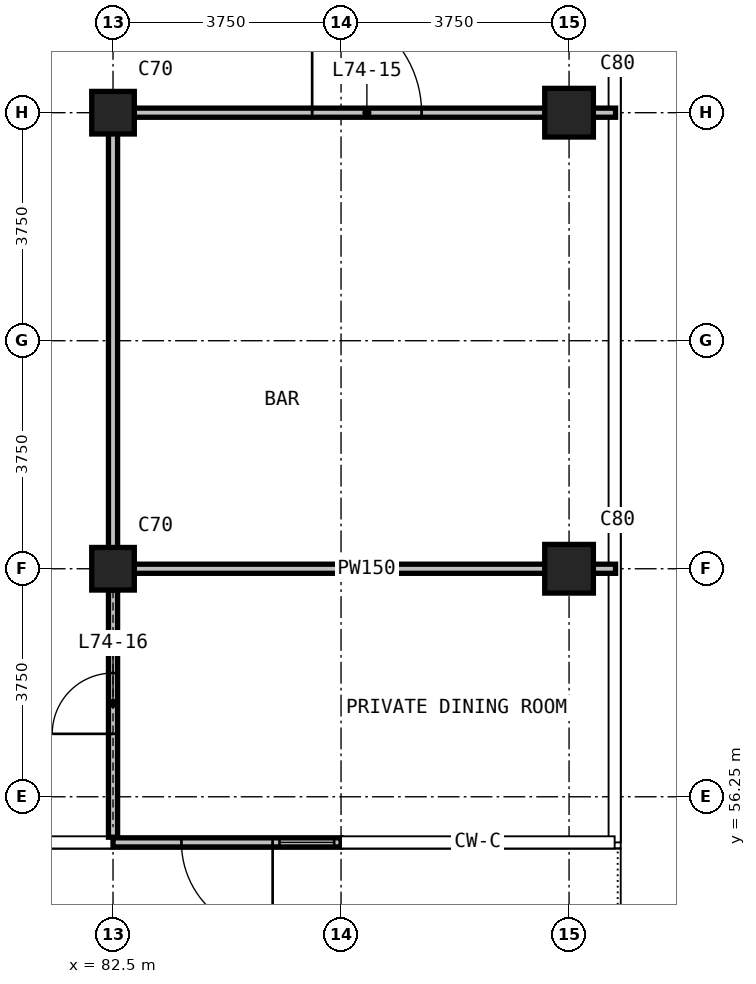
"""IFC4 building model, lengths in metres.
Left out: names, types, materials, properties, quantities, classifications, styles, units other than length and angle.
Written with IfcOpenShell. Run it as: python <this file> out.ifc"""

import sys

from ifc_helpers import new_model, si_unit, direction, frame, frame_2d, origin, origin_2d, place, context, subcontext, project, spatial, rectangle, extrude, element, fill, save


model = new_model("IFC4")
c1 = context("Model", 3, precision=1e-05, world=origin(), true_north=direction((0.0, 1.0)))
c2 = subcontext(c1, "Body", "Model", "MODEL_VIEW")
j1 = project(units=[si_unit("LENGTHUNIT", "METRE"), si_unit("PLANEANGLEUNIT", "RADIAN")], contexts=[c1])
p1 = place(None, origin())
s1 = spatial("IfcSite", under=j1, at=p1, CompositionType="ELEMENT")
p2 = place(p1, origin())
s2 = spatial("IfcBuilding", under=s1, at=p2, CompositionType="ELEMENT")
p3 = place(p2, frame((0.0, 0.0, 283.7)))
s3 = spatial("IfcBuildingStorey", under=s2, at=p3, CompositionType="ELEMENT", Elevation=283.7)
for number, where, z_axis, x_axis in (
    (1, (82.5, 60.0, 0.0), (0.0, 0.0, 1.0), (1.0, 0.0, 0.0)),
    (2, (82.5, 67.5, 0.0), (0.0, 0.0, 1.0), (1.0, 0.0, 0.0)),
):
    element("IfcColumn", number, at=place(p3, frame(where, z_axis=z_axis, x_axis=x_axis)), inside=s3, PredefinedType="COLUMN", context=c2, shape_type="SweptSolid", body=[
        extrude(rectangle(XDim=0.7, YDim=0.7, at=origin_2d()), origin(), (0.0, 0.0, 1.0), 4.0),
    ])
for number, where, z_axis, x_axis in (
    (3, (90.0, 60.0, 0.0), (0.0, 0.0, 1.0), (1.0, 0.0, 0.0)),
    (4, (90.0, 67.5, 0.0), (0.0, 0.0, 1.0), (1.0, 0.0, 0.0)),
):
    element("IfcColumn", number, at=place(p3, frame(where, z_axis=z_axis, x_axis=x_axis)), inside=s3, PredefinedType="COLUMN", context=c2, shape_type="SweptSolid", body=[
        extrude(rectangle(XDim=0.8, YDim=0.8, at=origin_2d()), origin(), (0.0, 0.0, 1.0), 4.0),
    ])
p4 = place(p3, frame((86.25, 55.5, 0.0), z_axis=(0.0, 0.0, 1.0), x_axis=(-1.0, 0.0, 0.0)))
e5 = element("IfcWall", 5, at=p4, inside=s3, PredefinedType="SOLIDWALL", context=c2, shape_type="SweptSolid", body=[
    extrude(rectangle(XDim=3.75, YDim=0.15, at=frame_2d((1.875, 0.0))), origin(), (0.0, 0.0, 1.0), 3.65),
])
p5 = place(p4, frame((0.113, 0.0, 0.1)))
e6 = element("IfcOpeningElement", 6, at=p5, cuts=e5, PredefinedType="OPENING", context=c2, shape_type="SweptSolid", body=[
    extrude(rectangle(XDim=0.9, YDim=2.4, at=frame_2d((0.45, 1.2))), frame((0.0, 0.085, 0.0), z_axis=(0.0, -1.0, 0.0), x_axis=(1.0, 0.0, 0.0)), (0.0, 0.0, 1.0), 0.17),
])
p6 = place(p4, frame((1.125, 0.0, 0.0)))
e7 = element("IfcOpeningElement", 7, at=p6, cuts=e5, PredefinedType="OPENING", context=c2, shape_type="SweptSolid", body=[
    extrude(rectangle(XDim=1.5, YDim=2.4, at=frame_2d((0.75, 1.2))), frame((0.0, 0.085, 0.0), z_axis=(0.0, -1.0, 0.0), x_axis=(1.0, 0.0, 0.0)), (0.0, 0.0, 1.0), 0.17),
])
p7 = place(p3, frame((82.575, 60.0, 0.0), z_axis=(0.0, 0.0, 1.0), x_axis=(1.0, 0.0, 0.0)))
e8 = element("IfcWall", 8, at=p7, inside=s3, PredefinedType="PARTITIONING", context=c2, shape_type="SweptSolid", body=[
    extrude(rectangle(XDim=8.19, YDim=0.15, at=frame_2d((4.095, 0.0))), origin(), (0.0, 0.0, 1.0), 3.65),
])
p8 = place(p3, frame((82.575, 67.5, 0.0), z_axis=(0.0, 0.0, 1.0), x_axis=(1.0, 0.0, 0.0)))
e9 = element("IfcWall", 9, at=p8, inside=s3, PredefinedType="PARTITIONING", context=c2, shape_type="SweptSolid", body=[
    extrude(rectangle(XDim=8.19, YDim=0.15, at=frame_2d((4.095, 0.0))), origin(), (0.0, 0.0, 1.0), 3.65),
])
p9 = place(p8, frame((3.2, 0.0, 0.0)))
e10 = element("IfcOpeningElement", 10, at=p9, cuts=e9, PredefinedType="OPENING", context=c2, shape_type="SweptSolid", body=[
    extrude(rectangle(XDim=1.8, YDim=2.2, at=frame_2d((0.9, 1.1))), frame((0.0, 0.085, 0.0), z_axis=(0.0, -1.0, 0.0), x_axis=(1.0, 0.0, 0.0)), (0.0, 0.0, 1.0), 0.17),
])
p10 = place(p3, frame((82.5, 55.585, 0.0), z_axis=(0.0, 0.0, 1.0), x_axis=(0.0, 1.0, 0.0)))
e11 = element("IfcWall", 11, at=p10, inside=s3, PredefinedType="PARTITIONING", context=c2, shape_type="SweptSolid", body=[
    extrude(rectangle(XDim=4.065, YDim=0.15, at=frame_2d((2.032, 0.0))), origin(), (0.0, 0.0, 1.0), 2.85),
])
p11 = place(p10, frame((1.7, 0.0, 0.0)))
e12 = element("IfcOpeningElement", 12, at=p11, cuts=e11, PredefinedType="OPENING", context=c2, shape_type="SweptSolid", body=[
    extrude(rectangle(XDim=1.0, YDim=2.2, at=frame_2d((0.5, 1.1))), frame((0.0, 0.085, 0.0), z_axis=(0.0, -1.0, 0.0), x_axis=(1.0, 0.0, 0.0)), (0.0, 0.0, 1.0), 0.17),
])
p12 = place(p3, frame((82.5, 59.65, 0.0), z_axis=(0.0, 0.0, 1.0), x_axis=(0.0, 1.0, 0.0)))
e13 = element("IfcWall", 13, at=p12, inside=s3, PredefinedType="PARTITIONING", context=c2, shape_type="SweptSolid", body=[
    extrude(rectangle(XDim=7.925, YDim=0.15, at=frame_2d((3.962, 0.0))), origin(), (0.0, 0.0, 1.0), 3.65),
])
p13 = place(p5, origin())
e14 = element("IfcWindow", 14, at=p13, inside=s3, PartitioningType="SINGLE_PANEL", PredefinedType="WINDOW", context=c2, shape_type="SweptSolid", body=[
    extrude(rectangle(XDim=0.9, YDim=2.4, at=frame_2d((0.45, 1.2))), frame((0.0, 0.03, 0.0), z_axis=(0.0, -1.0, 0.0), x_axis=(1.0, 0.0, 0.0)), (0.0, 0.0, 1.0), 0.06),
])
fill(e6, e14)
p14 = place(p6, origin())
e15 = element("IfcDoor", 15, at=p14, inside=s3, OperationType="DOUBLE_DOOR_SINGLE_SWING", PredefinedType="DOOR", context=c2, shape_type="SweptSolid", body=[
    extrude(rectangle(XDim=1.5, YDim=2.4, at=frame_2d((0.75, 1.2))), frame((0.0, 0.025, 0.0), z_axis=(0.0, -1.0, 0.0), x_axis=(1.0, 0.0, 0.0)), (0.0, 0.0, 1.0), 0.05),
])
fill(e7, e15)
p15 = place(p9, origin())
e16 = element("IfcDoor", 16, at=p15, inside=s3, OperationType="DOUBLE_DOOR_SINGLE_SWING", PredefinedType="DOOR", context=c2, shape_type="SweptSolid", body=[
    extrude(rectangle(XDim=1.8, YDim=2.2, at=frame_2d((0.9, 1.1))), frame((0.0, 0.025, 0.0), z_axis=(0.0, -1.0, 0.0), x_axis=(1.0, 0.0, 0.0)), (0.0, 0.0, 1.0), 0.05),
])
fill(e10, e16)
p16 = place(p11, origin())
e17 = element("IfcDoor", 17, at=p16, inside=s3, OperationType="SINGLE_SWING_RIGHT", PredefinedType="DOOR", context=c2, shape_type="SweptSolid", body=[
    extrude(rectangle(XDim=1.0, YDim=2.2, at=frame_2d((0.5, 1.1))), frame((0.0, 0.025, 0.0), z_axis=(0.0, -1.0, 0.0), x_axis=(1.0, 0.0, 0.0)), (0.0, 0.0, 1.0), 0.05),
])
fill(e12, e17)
save(model, sys.argv[1])
